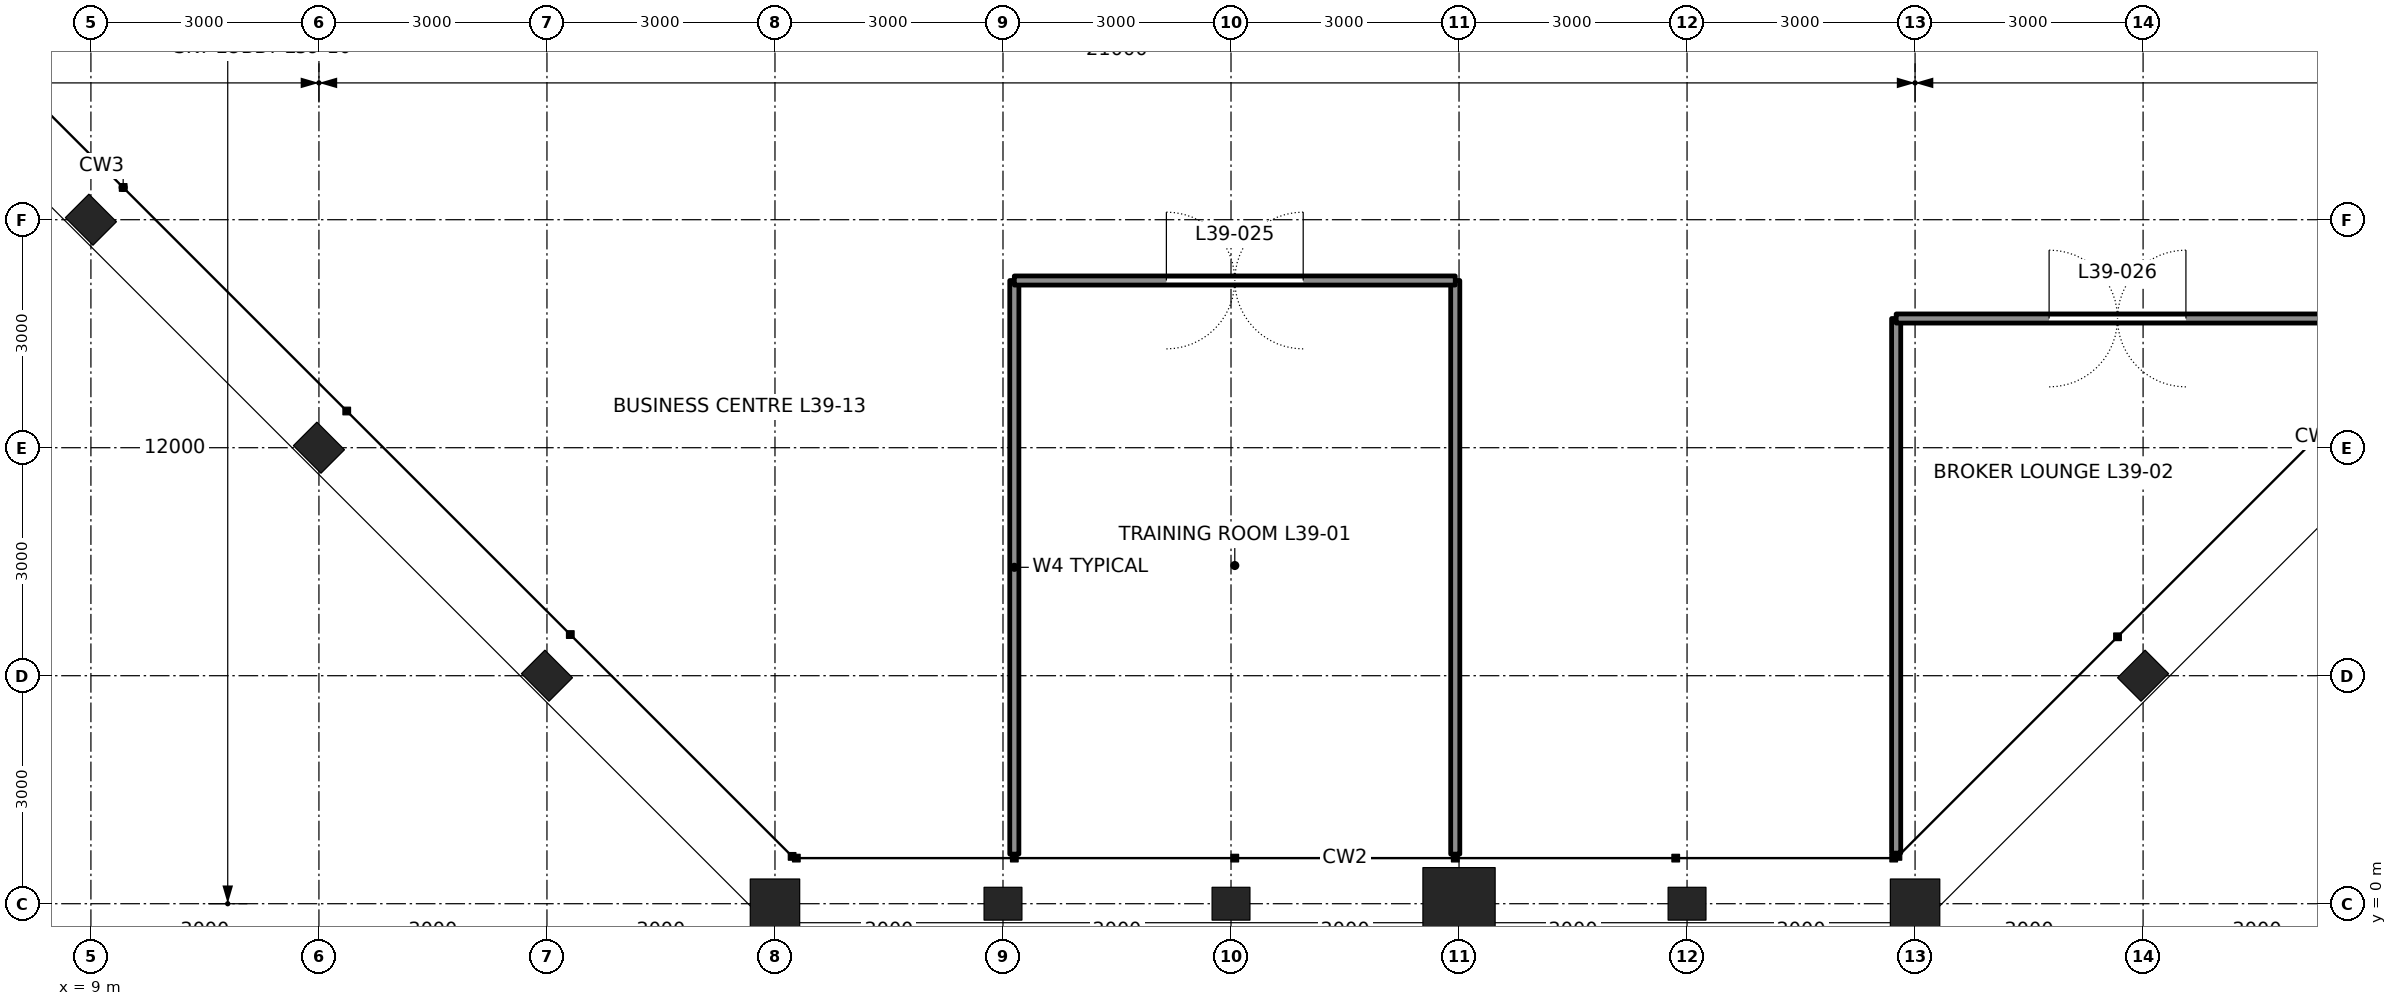
"""IFC4 building model, lengths in metres.
Left out: names, types, materials, properties, quantities, classifications, styles, units other than length and angle.
Written with IfcOpenShell. Run it as: python <this file> out.ifc"""

import sys

from ifc_helpers import new_model, si_unit, direction, frame, frame_2d, origin, origin_2d, place, context, subcontext, project, spatial, rectangle, hollow_rectangle, i_section, extrude, element, fill, save


model = new_model("IFC4")
c1 = context("Model", 3, precision=1e-05, world=origin(), true_north=direction((0.0, 1.0)))
c2 = subcontext(c1, "Body", "Model", "MODEL_VIEW")
j1 = project(units=[si_unit("LENGTHUNIT", "METRE"), si_unit("PLANEANGLEUNIT", "RADIAN")], contexts=[c1])
p1 = place(None, origin())
s1 = spatial("IfcSite", under=j1, at=p1, CompositionType="ELEMENT")
p2 = place(p1, origin())
s2 = spatial("IfcBuilding", under=s1, at=p2, CompositionType="ELEMENT")
p3 = place(p2, frame((0.0, 0.0, 180.0)))
s3 = spatial("IfcBuildingStorey", under=s2, at=p3, CompositionType="ELEMENT", Elevation=180.0)
p4 = place(p3, frame((18.0, 0.0, 0.0), z_axis=(0.0, 0.0, 1.0), x_axis=(0.0, -1.0, 0.0)))
e1 = element("IfcColumn", 1, at=p4, inside=s3, PredefinedType="COLUMN", context=c2, shape_type="SweptSolid", body=[
    extrude(hollow_rectangle(XDim=0.65, YDim=0.65, WallThickness=0.065, at=origin_2d()), origin(), (0.0, 0.0, 1.0), 4.5),
])
for number, where, z_axis, x_axis in (
    (2, (21.0, 0.0, 0.0), (0.0, 0.0, 1.0), (0.0, -1.0, 0.0)),
    (3, (24.0, 0.0, 0.0), (0.0, 0.0, 1.0), (0.0, -1.0, 0.0)),
):
    element("IfcColumn", number, at=place(p3, frame(where, z_axis=z_axis, x_axis=x_axis)), inside=s3, PredefinedType="COLUMN", context=c2, shape_type="SweptSolid", body=[
        extrude(i_section(OverallWidth=0.432, OverallDepth=0.498, WebThickness=0.056, FlangeThickness=0.089, at=origin_2d()), origin(), (0.0, 0.0, 1.0), 4.5),
    ])
p5 = place(p3, frame((27.0, 0.0, 0.0), z_axis=(0.0, 0.0, 1.0), x_axis=(0.0, -1.0, 0.0)))
e4 = element("IfcColumn", 4, at=p5, inside=s3, PredefinedType="COLUMN", context=c2, shape_type="SweptSolid", body=[
    extrude(hollow_rectangle(XDim=0.95, YDim=0.95, WallThickness=0.11, at=origin_2d()), origin(), (0.0, 0.0, 1.0), 4.5),
])
p6 = place(p3, frame((30.0, 0.0, 0.0), z_axis=(0.0, 0.0, 1.0), x_axis=(0.0, -1.0, 0.0)))
e5 = element("IfcColumn", 5, at=p6, inside=s3, PredefinedType="COLUMN", context=c2, shape_type="SweptSolid", body=[
    extrude(i_section(OverallWidth=0.432, OverallDepth=0.498, WebThickness=0.056, FlangeThickness=0.089, at=origin_2d()), origin(), (0.0, 0.0, 1.0), 4.5),
])
p7 = place(p3, frame((33.0, 0.0, 0.0), z_axis=(0.0, 0.0, 1.0), x_axis=(0.0, -1.0, 0.0)))
e6 = element("IfcColumn", 6, at=p7, inside=s3, PredefinedType="COLUMN", context=c2, shape_type="SweptSolid", body=[
    extrude(hollow_rectangle(XDim=0.65, YDim=0.65, WallThickness=0.065, at=origin_2d()), origin(), (0.0, 0.0, 1.0), 4.5),
])
p8 = place(p3, frame((36.0, 3.0, -0.91), z_axis=(0.0, 0.0, 1.0), x_axis=(0.707106781187, -0.707106781187, 0.0)))
e7 = element("IfcColumn", 7, at=p8, inside=s3, PredefinedType="COLUMN", context=c2, shape_type="SweptSolid", body=[
    extrude(i_section(OverallWidth=0.437, OverallDepth=0.513, WebThickness=0.061, FlangeThickness=0.097, at=origin_2d()), origin(), (0.0, 0.0, 1.0), 5.41),
])
for number, where, z_axis, x_axis in (
    (8, (9.0, 9.0, 0.0), (0.0, 0.0, 1.0), (-0.707, -0.707, 0.0)),
    (9, (12.0, 6.0, 0.0), (0.0, 0.0, 1.0), (-0.707, -0.707, 0.0)),
    (10, (15.0, 3.0, 0.0), (0.0, 0.0, 1.0), (-0.707, -0.707, 0.0)),
):
    element("IfcColumn", number, at=place(p3, frame(where, z_axis=z_axis, x_axis=x_axis)), inside=s3, PredefinedType="COLUMN", context=c2, shape_type="SweptSolid", body=[
        extrude(i_section(OverallWidth=0.437, OverallDepth=0.513, WebThickness=0.061, FlangeThickness=0.097, at=origin_2d()), origin(), (0.0, 0.0, 1.0), 4.5),
    ])
p9 = place(p3, frame((21.149, 0.653, 0.0), z_axis=(0.0, 0.0, 1.0), x_axis=(0.0, 1.0, 0.0)))
e11 = element("IfcWall", 11, at=p9, inside=s3, PredefinedType="PARTITIONING", context=c2, shape_type="SweptSolid", body=[
    extrude(rectangle(XDim=7.547, YDim=0.12, at=frame_2d((3.774, 0.0))), origin(), (0.0, 0.0, 1.0), 4.34),
])
p10 = place(p3, frame((26.95, 0.653, 0.0), z_axis=(0.0, 0.0, 1.0), x_axis=(0.0, 1.0, 0.0)))
e12 = element("IfcWall", 12, at=p10, inside=s3, PredefinedType="PARTITIONING", context=c2, shape_type="SweptSolid", body=[
    extrude(rectangle(XDim=7.547, YDim=0.12, at=frame_2d((3.774, 0.0))), origin(), (0.0, 0.0, 1.0), 3.657),
])
p11 = place(p3, frame((32.751, 0.666, 0.0), z_axis=(0.0, 0.0, 1.0), x_axis=(0.0, 1.0, 0.0)))
e13 = element("IfcWall", 13, at=p11, inside=s3, PredefinedType="PARTITIONING", context=c2, shape_type="SweptSolid", body=[
    extrude(rectangle(XDim=7.034, YDim=0.12, at=frame_2d((3.517, 0.0))), origin(), (0.0, 0.0, 1.0), 4.34),
])
p12 = place(p3, frame((21.149, 8.2, 0.0), z_axis=(0.0, 0.0, 1.0), x_axis=(1.0, 0.0, 0.0)))
e14 = element("IfcWall", 14, at=p12, inside=s3, PredefinedType="PARTITIONING", context=c2, shape_type="SweptSolid", body=[
    extrude(rectangle(XDim=5.801, YDim=0.12, at=frame_2d((2.9, 0.0))), origin(), (0.0, 0.0, 1.0), 4.34),
])
p13 = place(p12, frame((2.0, 0.0, 0.0)))
e15 = element("IfcOpeningElement", 15, at=p13, cuts=e14, PredefinedType="OPENING", context=c2, shape_type="SweptSolid", body=[
    extrude(rectangle(XDim=1.8, YDim=2.4, at=frame_2d((0.9, 1.2))), frame((0.0, 0.07, 0.0), z_axis=(0.0, -1.0, 0.0), x_axis=(1.0, 0.0, 0.0)), (0.0, 0.0, 1.0), 0.14),
])
p14 = place(p3, frame((32.751, 7.7, 0.0), z_axis=(0.0, 0.0, 1.0), x_axis=(1.0, 0.0, 0.0)))
e16 = element("IfcWall", 16, at=p14, inside=s3, PredefinedType="PARTITIONING", context=c2, shape_type="SweptSolid", body=[
    extrude(rectangle(XDim=5.824, YDim=0.12, at=frame_2d((2.912, 0.0))), origin(), (0.0, 0.0, 1.0), 4.34),
])
p15 = place(p14, frame((2.012, 0.0, 0.0)))
e17 = element("IfcOpeningElement", 17, at=p15, cuts=e16, PredefinedType="OPENING", context=c2, shape_type="SweptSolid", body=[
    extrude(rectangle(XDim=1.8, YDim=2.4, at=frame_2d((0.9, 1.2))), frame((0.0, 0.07, 0.0), z_axis=(0.0, -1.0, 0.0), x_axis=(1.0, 0.0, 0.0)), (0.0, 0.0, 1.0), 0.14),
])
p16 = place(p13, origin())
e18 = element("IfcDoor", 18, at=p16, inside=s3, OperationType="DOUBLE_DOOR_DOUBLE_SWING", PredefinedType="DOOR", context=c2, shape_type="SweptSolid", body=[
    extrude(rectangle(XDim=1.8, YDim=2.4, at=frame_2d((0.9, 1.2))), frame((0.0, 0.025, 0.0), z_axis=(0.0, -1.0, 0.0), x_axis=(1.0, 0.0, 0.0)), (0.0, 0.0, 1.0), 0.05),
])
fill(e15, e18)
p17 = place(p15, origin())
e19 = element("IfcDoor", 19, at=p17, inside=s3, OperationType="DOUBLE_DOOR_DOUBLE_SWING", PredefinedType="DOOR", context=c2, shape_type="SweptSolid", body=[
    extrude(rectangle(XDim=1.8, YDim=2.4, at=frame_2d((0.9, 1.2))), frame((0.0, 0.025, 0.0), z_axis=(0.0, -1.0, 0.0), x_axis=(1.0, 0.0, 0.0)), (0.0, 0.0, 1.0), 0.05),
])
fill(e17, e19)
save(model, sys.argv[1])
